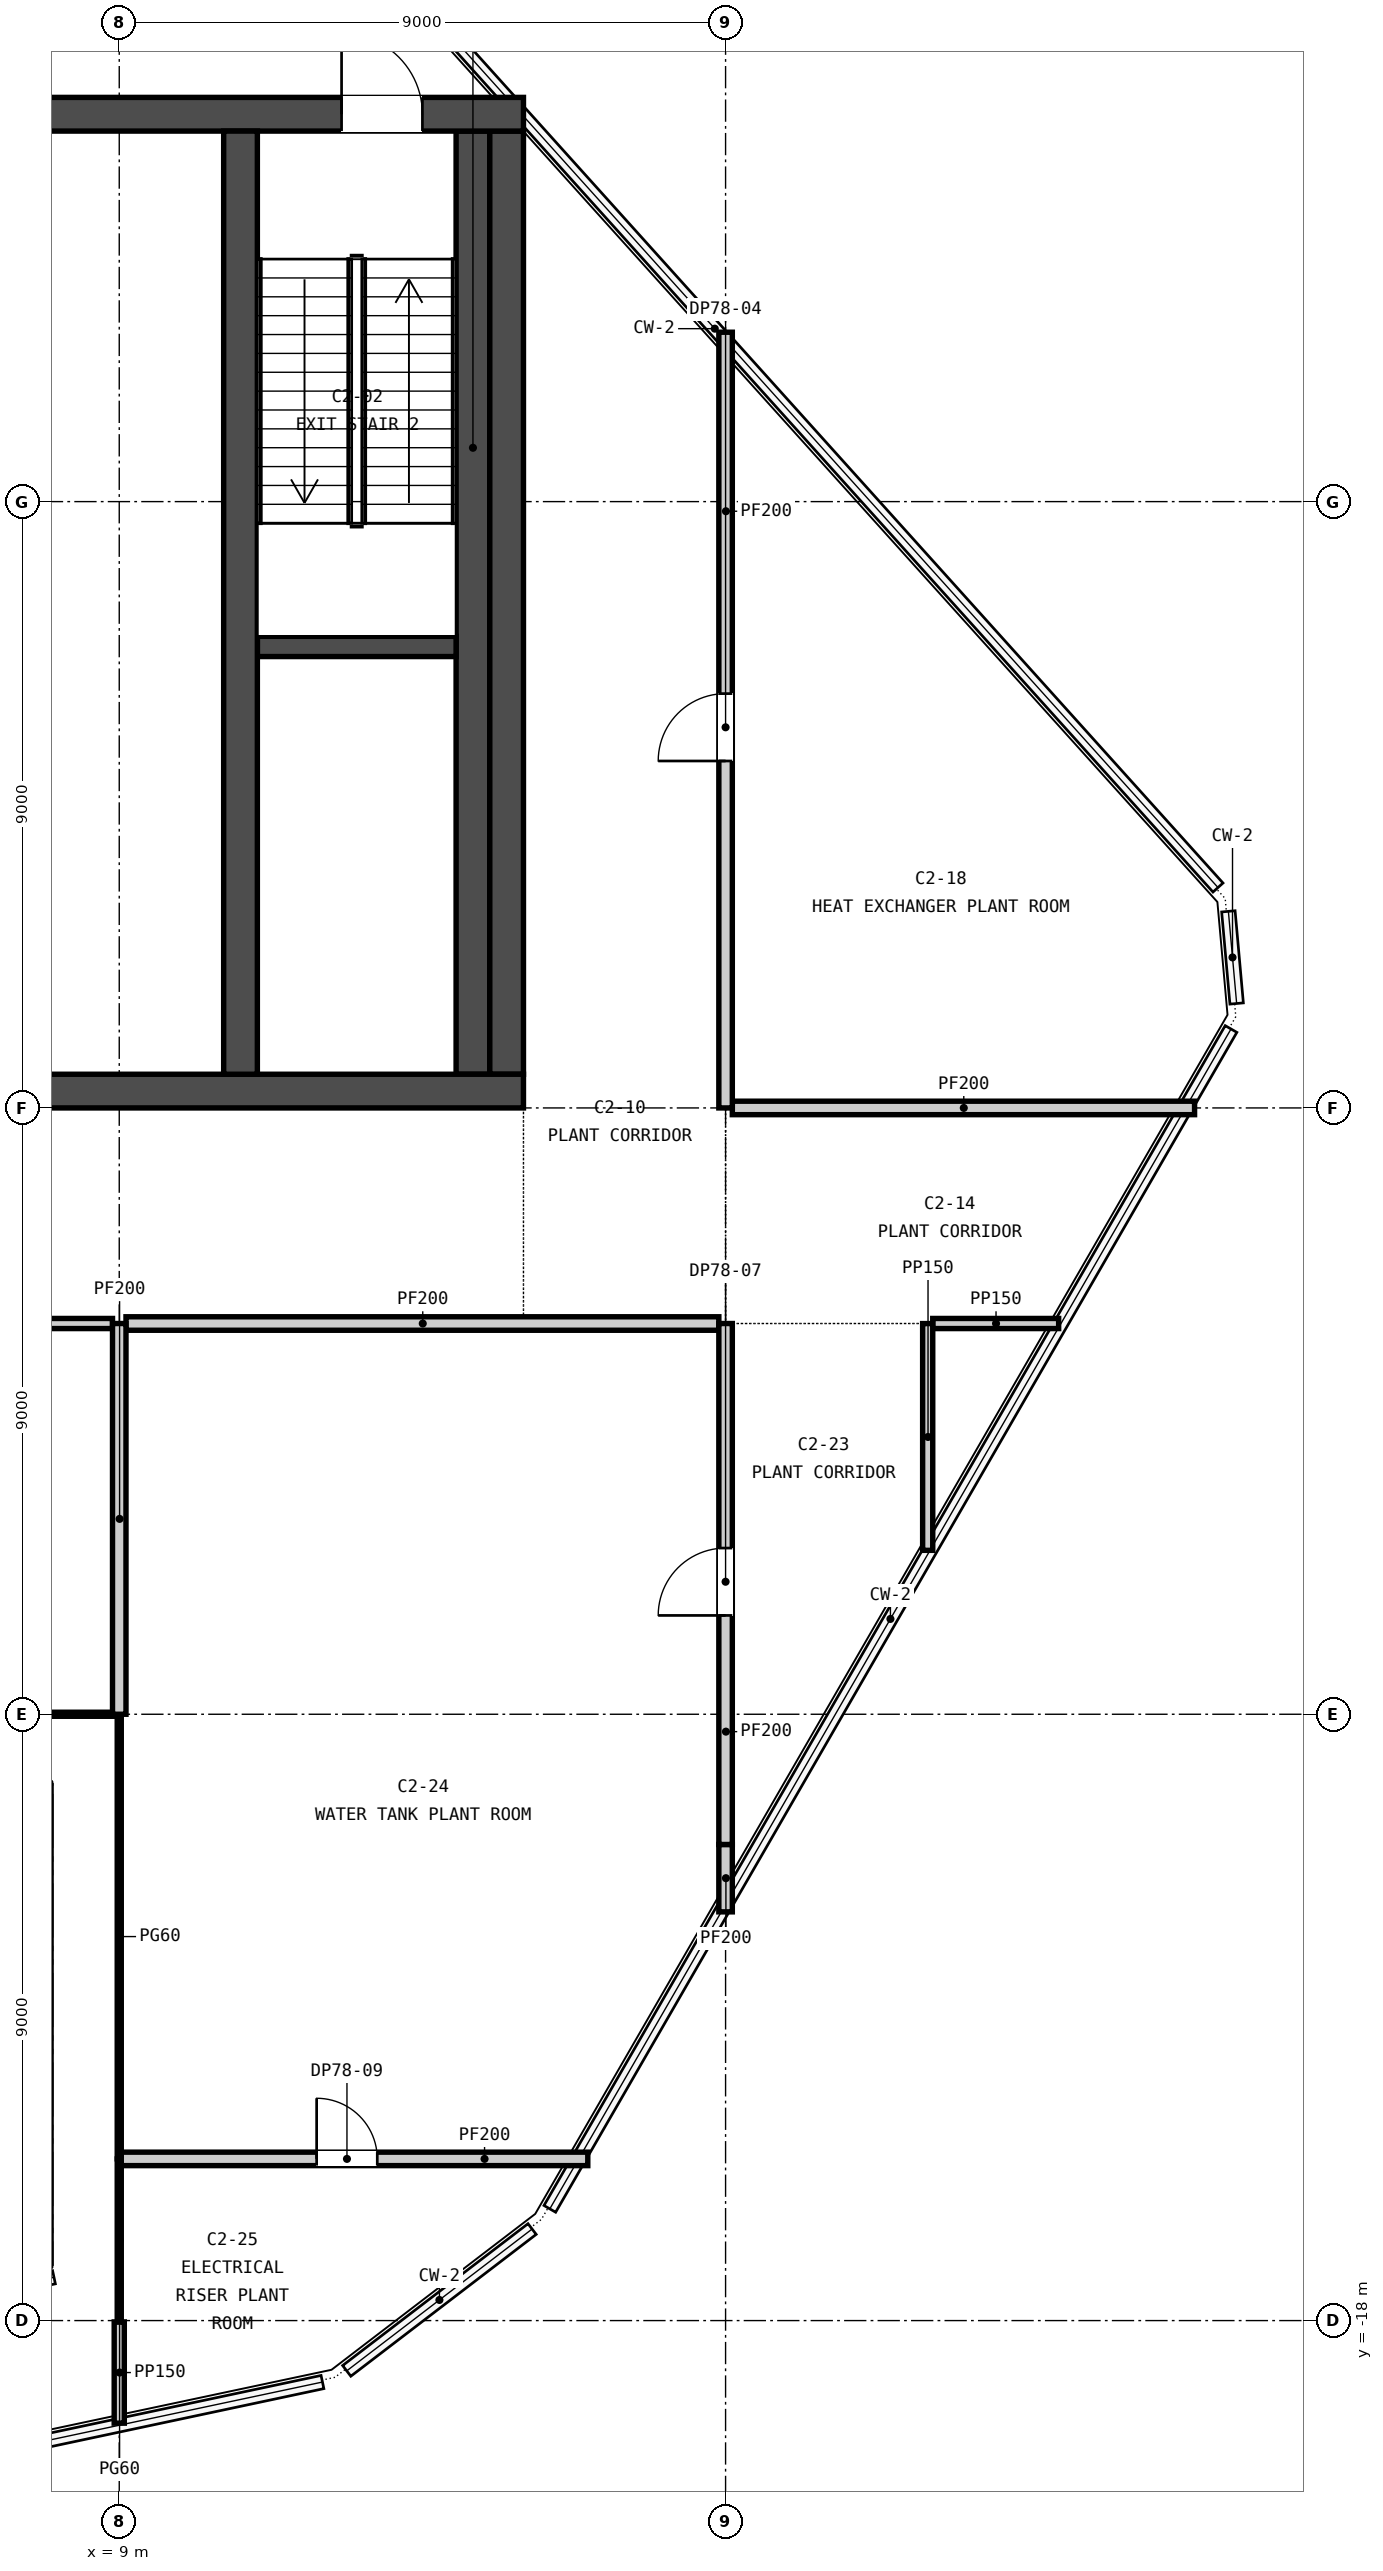
"""IFC4 building model, lengths in metres.
Left out: names, types, materials, properties, quantities, classifications, styles, units other than length and angle.
Written with IfcOpenShell. Run it as: python <this file> out.ifc"""

import sys

from ifc_helpers import new_model, si_unit, direction, frame, frame_2d, origin, place, context, subcontext, project, spatial, rectangle, extrude, element, fill, save


model = new_model("IFC4")
c1 = context("Model", 3, precision=1e-05, world=origin(), true_north=direction((0.0, 1.0)))
c2 = subcontext(c1, "Body", "Model", "MODEL_VIEW")
j1 = project(units=[si_unit("LENGTHUNIT", "METRE"), si_unit("PLANEANGLEUNIT", "RADIAN")], contexts=[c1])
p1 = place(None, origin())
s1 = spatial("IfcSite", under=j1, at=p1, CompositionType="ELEMENT")
p2 = place(p1, origin())
s2 = spatial("IfcBuilding", under=s1, at=p2, CompositionType="ELEMENT")
p3 = place(p2, frame((0.0, 0.0, 306.1)))
s3 = spatial("IfcBuildingStorey", under=s2, at=p3, CompositionType="ELEMENT", Elevation=306.1)
p4 = place(p3, frame((-15.0, 0.25, -0.25), z_axis=(0.0, 0.0, 1.0), x_axis=(1.0, 0.0, 0.0)))
e1 = element("IfcWall", 1, at=p4, inside=s3, PredefinedType="SOLIDWALL", context=c2, shape_type="SweptSolid", body=[
    extrude(rectangle(XDim=30.0, YDim=0.5, at=frame_2d((15.0, 0.0))), origin(), (0.0, 0.0, 1.0), 5.0),
])
p5 = place(p3, frame((-15.0, 14.75, -0.25), z_axis=(0.0, 0.0, 1.0), x_axis=(1.0, 0.0, 0.0)))
e2 = element("IfcWall", 2, at=p5, inside=s3, PredefinedType="SOLIDWALL", context=c2, shape_type="SweptSolid", body=[
    extrude(rectangle(XDim=30.0, YDim=0.5, at=frame_2d((15.0, 0.0))), origin(), (0.0, 0.0, 1.0), 5.0),
])
p6 = place(p5, frame((1.5, 0.0, 0.25)))
e3 = element("IfcOpeningElement", 3, at=p6, cuts=e2, PredefinedType="OPENING", context=c2, shape_type="SweptSolid", body=[
    extrude(rectangle(XDim=1.2, YDim=2.1, at=frame_2d((0.6, 1.05))), frame((0.0, 0.26, 0.0), z_axis=(0.0, -1.0, 0.0), x_axis=(1.0, 0.0, 0.0)), (0.0, 0.0, 1.0), 0.52),
])
p7 = place(p5, frame((27.3, 0.0, 0.25)))
e4 = element("IfcOpeningElement", 4, at=p7, cuts=e2, PredefinedType="OPENING", context=c2, shape_type="SweptSolid", body=[
    extrude(rectangle(XDim=1.2, YDim=2.1, at=frame_2d((0.6, 1.05))), frame((0.0, 0.26, 0.0), z_axis=(0.0, -1.0, 0.0), x_axis=(1.0, 0.0, 0.0)), (0.0, 0.0, 1.0), 0.52),
])
p8 = place(p5, frame((9.25, 0.0, 0.25)))
e5 = element("IfcOpeningElement", 5, at=p8, cuts=e2, PredefinedType="OPENING", context=c2, shape_type="SweptSolid", body=[
    extrude(rectangle(XDim=1.5, YDim=2.1, at=frame_2d((0.75, 1.05))), frame((0.0, 0.26, 0.0), z_axis=(0.0, -1.0, 0.0), x_axis=(1.0, 0.0, 0.0)), (0.0, 0.0, 1.0), 0.52),
])
for number, where, z_axis, x_axis in (
    (6, (14.75, 0.5, -0.25), (0.0, 0.0, 1.0), (0.0, 1.0, 0.0)),
    (7, (10.8, 0.5, -0.25), (0.0, 0.0, 1.0), (0.0, 1.0, 0.0)),
):
    element("IfcWall", number, at=place(p3, frame(where, z_axis=z_axis, x_axis=x_axis)), inside=s3, PredefinedType="SOLIDWALL", context=c2, shape_type="SweptSolid", body=[
        extrude(rectangle(XDim=14.0, YDim=0.5, at=frame_2d((7.0, 0.0))), origin(), (0.0, 0.0, 1.0), 5.0),
    ])
p9 = place(p3, frame((11.05, 6.85, 0.0), z_axis=(0.0, 0.0, 1.0), x_axis=(1.0, 0.0, 0.0)))
e8 = element("IfcWall", 8, at=p9, inside=s3, PredefinedType="SOLIDWALL", context=c2, shape_type="SweptSolid", body=[
    extrude(rectangle(XDim=2.95, YDim=0.3, at=frame_2d((1.475, 0.0))), origin(), (0.0, 0.0, 1.0), 4.75),
])
p10 = place(p3, frame((14.25, 0.5, 0.0), z_axis=(0.0, 0.0, 1.0), x_axis=(0.0, 1.0, 0.0)))
e9 = element("IfcWall", 9, at=p10, inside=s3, PredefinedType="SOLIDWALL", context=c2, shape_type="SweptSolid", body=[
    extrude(rectangle(XDim=14.0, YDim=0.5, at=frame_2d((7.0, 0.0))), origin(), (0.0, 0.0, 1.0), 4.75),
])
p11 = place(p3, frame((9.03, -15.6, 0.0), z_axis=(0.0, 0.0, 1.0), x_axis=(1.0, 0.0, 0.0)))
e10 = element("IfcWall", 10, at=p11, inside=s3, PredefinedType="PARTITIONING", context=c2, shape_type="SweptSolid", body=[
    extrude(rectangle(XDim=6.925, YDim=0.2, at=frame_2d((3.462, 0.0))), origin(), (0.0, 0.0, 1.0), 4.75),
])
p12 = place(p11, frame((2.9, 0.0, 0.0)))
e11 = element("IfcOpeningElement", 11, at=p12, cuts=e10, PredefinedType="OPENING", context=c2, shape_type="SweptSolid", body=[
    extrude(rectangle(XDim=0.9, YDim=2.1, at=frame_2d((0.45, 1.05))), frame((0.0, 0.11, 0.0), z_axis=(0.0, -1.0, 0.0), x_axis=(1.0, 0.0, 0.0)), (0.0, 0.0, 1.0), 0.22),
])
p13 = place(p3, frame((-8.9, -9.0, 0.0), z_axis=(0.0, 0.0, 1.0), x_axis=(1.0, 0.0, 0.0)))
e12 = element("IfcWall", 12, at=p13, inside=s3, PredefinedType="PARTITIONING", context=c2, shape_type="SweptSolid", body=[
    extrude(rectangle(XDim=17.8, YDim=0.06, at=frame_2d((8.9, 0.0))), origin(), (0.0, 0.0, 1.0), 4.75),
])
p14 = place(p3, frame((-8.9, -3.2, 0.0), z_axis=(0.0, 0.0, 1.0), x_axis=(1.0, 0.0, 0.0)))
e13 = element("IfcWall", 13, at=p14, inside=s3, PredefinedType="PARTITIONING", context=c2, shape_type="SweptSolid", body=[
    extrude(rectangle(XDim=17.8, YDim=0.15, at=frame_2d((8.9, 0.0))), origin(), (0.0, 0.0, 1.0), 4.75),
])
p15 = place(p14, frame((8.4, 0.0, 0.0)))
e14 = element("IfcOpeningElement", 14, at=p15, cuts=e13, PredefinedType="OPENING", context=c2, shape_type="SweptSolid", body=[
    extrude(rectangle(XDim=1.0, YDim=2.1, at=frame_2d((0.5, 1.05))), frame((0.0, 0.085, 0.0), z_axis=(0.0, -1.0, 0.0), x_axis=(1.0, 0.0, 0.0)), (0.0, 0.0, 1.0), 0.17),
])
p16 = place(p3, frame((9.1, -3.2, 0.0), z_axis=(0.0, 0.0, 1.0), x_axis=(1.0, 0.0, 0.0)))
e15 = element("IfcWall", 15, at=p16, inside=s3, PredefinedType="PARTITIONING", context=c2, shape_type="SweptSolid", body=[
    extrude(rectangle(XDim=8.8, YDim=0.2, at=frame_2d((4.4, 0.0))), origin(), (0.0, 0.0, 1.0), 4.75),
])
p17 = place(p3, frame((21.075, -3.2, 0.0), z_axis=(0.0, 0.0, 1.0), x_axis=(1.0, 0.0, 0.0)))
e16 = element("IfcWall", 16, at=p17, inside=s3, PredefinedType="PARTITIONING", context=c2, shape_type="SweptSolid", body=[
    extrude(rectangle(XDim=1.869, YDim=0.15, at=frame_2d((0.935, 0.0))), origin(), (0.0, 0.0, 1.0), 4.75),
])
p18 = place(p3, frame((18.1, 0.0, 0.0), z_axis=(0.0, 0.0, 1.0), x_axis=(1.0, 0.0, 0.0)))
e17 = element("IfcWall", 17, at=p18, inside=s3, PredefinedType="PARTITIONING", context=c2, shape_type="SweptSolid", body=[
    extrude(rectangle(XDim=6.861, YDim=0.2, at=frame_2d((3.431, 0.0))), origin(), (0.0, 0.0, 1.0), 4.75),
])
p19 = place(p3, frame((9.0, -19.523, 0.0), z_axis=(0.0, 0.0, 1.0), x_axis=(0.0, 1.0, 0.0)))
e18 = element("IfcWall", 18, at=p19, inside=s3, PredefinedType="PARTITIONING", context=c2, shape_type="SweptSolid", body=[
    extrude(rectangle(XDim=1.503, YDim=0.15, at=frame_2d((0.751, 0.0))), origin(), (0.0, 0.0, 1.0), 4.75),
])
p20 = place(p3, frame((9.0, -18.02, 0.0), z_axis=(0.0, 0.0, 1.0), x_axis=(0.0, 1.0, 0.0)))
e19 = element("IfcWall", 19, at=p20, inside=s3, PredefinedType="PARTITIONING", context=c2, shape_type="SweptSolid", body=[
    extrude(rectangle(XDim=2.419, YDim=0.06, at=frame_2d((1.209, 0.0))), origin(), (0.0, 0.0, 1.0), 4.75),
])
p21 = place(p3, frame((9.0, -15.599, 0.0), z_axis=(0.0, 0.0, 1.0), x_axis=(0.0, 1.0, 0.0)))
e20 = element("IfcWall", 20, at=p21, inside=s3, PredefinedType="PARTITIONING", context=c2, shape_type="SweptSolid", body=[
    extrude(rectangle(XDim=6.598, YDim=0.06, at=frame_2d((3.299, 0.0))), origin(), (0.0, 0.0, 1.0), 4.75),
])
p22 = place(p3, frame((9.0, -9.0, 0.0), z_axis=(0.0, 0.0, 1.0), x_axis=(0.0, 1.0, 0.0)))
e21 = element("IfcWall", 21, at=p22, inside=s3, PredefinedType="PARTITIONING", context=c2, shape_type="SweptSolid", body=[
    extrude(rectangle(XDim=5.8, YDim=0.2, at=frame_2d((2.9, 0.0))), origin(), (0.0, 0.0, 1.0), 4.75),
])
p23 = place(p3, frame((18.0, -11.933, 0.0), z_axis=(0.0, 0.0, 1.0), x_axis=(0.0, 1.0, 0.0)))
e22 = element("IfcWall", 22, at=p23, inside=s3, PredefinedType="PARTITIONING", context=c2, shape_type="SweptSolid", body=[
    extrude(rectangle(XDim=1.0, YDim=0.2, at=frame_2d((0.5, 0.0))), origin(), (0.0, 0.0, 1.0), 4.134),
])
p24 = place(p3, frame((18.0, -10.933, 0.0), z_axis=(0.0, 0.0, 1.0), x_axis=(0.0, 1.0, 0.0)))
e23 = element("IfcWall", 23, at=p24, inside=s3, PredefinedType="PARTITIONING", context=c2, shape_type="SweptSolid", body=[
    extrude(rectangle(XDim=7.733, YDim=0.2, at=frame_2d((3.867, 0.0))), origin(), (0.0, 0.0, 1.0), 4.75),
])
p25 = place(p24, frame((3.4, 0.0, 0.0)))
e24 = element("IfcOpeningElement", 24, at=p25, cuts=e23, PredefinedType="OPENING", context=c2, shape_type="SweptSolid", body=[
    extrude(rectangle(XDim=1.0, YDim=2.1, at=frame_2d((0.5, 1.05))), frame((0.0, 0.11, 0.0), z_axis=(0.0, -1.0, 0.0), x_axis=(1.0, 0.0, 0.0)), (0.0, 0.0, 1.0), 0.22),
])
p26 = place(p3, frame((18.0, 0.0, 0.0), z_axis=(0.0, 0.0, 1.0), x_axis=(0.0, 1.0, 0.0)))
e25 = element("IfcWall", 25, at=p26, inside=s3, PredefinedType="PARTITIONING", context=c2, shape_type="SweptSolid", body=[
    extrude(rectangle(XDim=11.514, YDim=0.2, at=frame_2d((5.757, 0.0))), origin(), (0.0, 0.0, 1.0), 4.75),
])
p27 = place(p26, frame((5.15, 0.0, 0.0)))
e26 = element("IfcOpeningElement", 26, at=p27, cuts=e25, PredefinedType="OPENING", context=c2, shape_type="SweptSolid", body=[
    extrude(rectangle(XDim=1.0, YDim=2.1, at=frame_2d((0.5, 1.05))), frame((0.0, 0.11, 0.0), z_axis=(0.0, -1.0, 0.0), x_axis=(1.0, 0.0, 0.0)), (0.0, 0.0, 1.0), 0.22),
])
p28 = place(p3, frame((21.0, -6.567, 0.0), z_axis=(0.0, 0.0, 1.0), x_axis=(0.0, 1.0, 0.0)))
e27 = element("IfcWall", 27, at=p28, inside=s3, PredefinedType="PARTITIONING", context=c2, shape_type="SweptSolid", body=[
    extrude(rectangle(XDim=3.366, YDim=0.15, at=frame_2d((1.683, 0.0))), origin(), (0.0, 0.0, 1.0), 4.75),
])
p29 = place(p7, origin())
e28 = element("IfcDoor", 28, at=p29, inside=s3, OperationType="SINGLE_SWING_LEFT", PredefinedType="DOOR", context=c2, shape_type="SweptSolid", body=[
    extrude(rectangle(XDim=1.2, YDim=2.1, at=frame_2d((0.6, 1.05))), frame((0.0, 0.025, 0.0), z_axis=(0.0, -1.0, 0.0), x_axis=(1.0, 0.0, 0.0)), (0.0, 0.0, 1.0), 0.05),
])
fill(e4, e28)
p30 = place(p27, origin())
e29 = element("IfcDoor", 29, at=p30, inside=s3, OperationType="SINGLE_SWING_LEFT", PredefinedType="DOOR", context=c2, shape_type="SweptSolid", body=[
    extrude(rectangle(XDim=1.0, YDim=2.1, at=frame_2d((0.5, 1.05))), frame((0.0, 0.025, 0.0), z_axis=(0.0, -1.0, 0.0), x_axis=(1.0, 0.0, 0.0)), (0.0, 0.0, 1.0), 0.05),
])
fill(e26, e29)
p31 = place(p25, origin())
e30 = element("IfcDoor", 30, at=p31, inside=s3, OperationType="SINGLE_SWING_LEFT", PredefinedType="DOOR", context=c2, shape_type="SweptSolid", body=[
    extrude(rectangle(XDim=1.0, YDim=2.1, at=frame_2d((0.5, 1.05))), frame((0.0, 0.025, 0.0), z_axis=(0.0, -1.0, 0.0), x_axis=(1.0, 0.0, 0.0)), (0.0, 0.0, 1.0), 0.05),
])
fill(e24, e30)
p32 = place(p12, origin())
e31 = element("IfcDoor", 31, at=p32, inside=s3, OperationType="SINGLE_SWING_LEFT", PredefinedType="DOOR", context=c2, shape_type="SweptSolid", body=[
    extrude(rectangle(XDim=0.9, YDim=2.1, at=frame_2d((0.45, 1.05))), frame((0.0, 0.025, 0.0), z_axis=(0.0, -1.0, 0.0), x_axis=(1.0, 0.0, 0.0)), (0.0, 0.0, 1.0), 0.05),
])
fill(e11, e31)
save(model, sys.argv[1])
